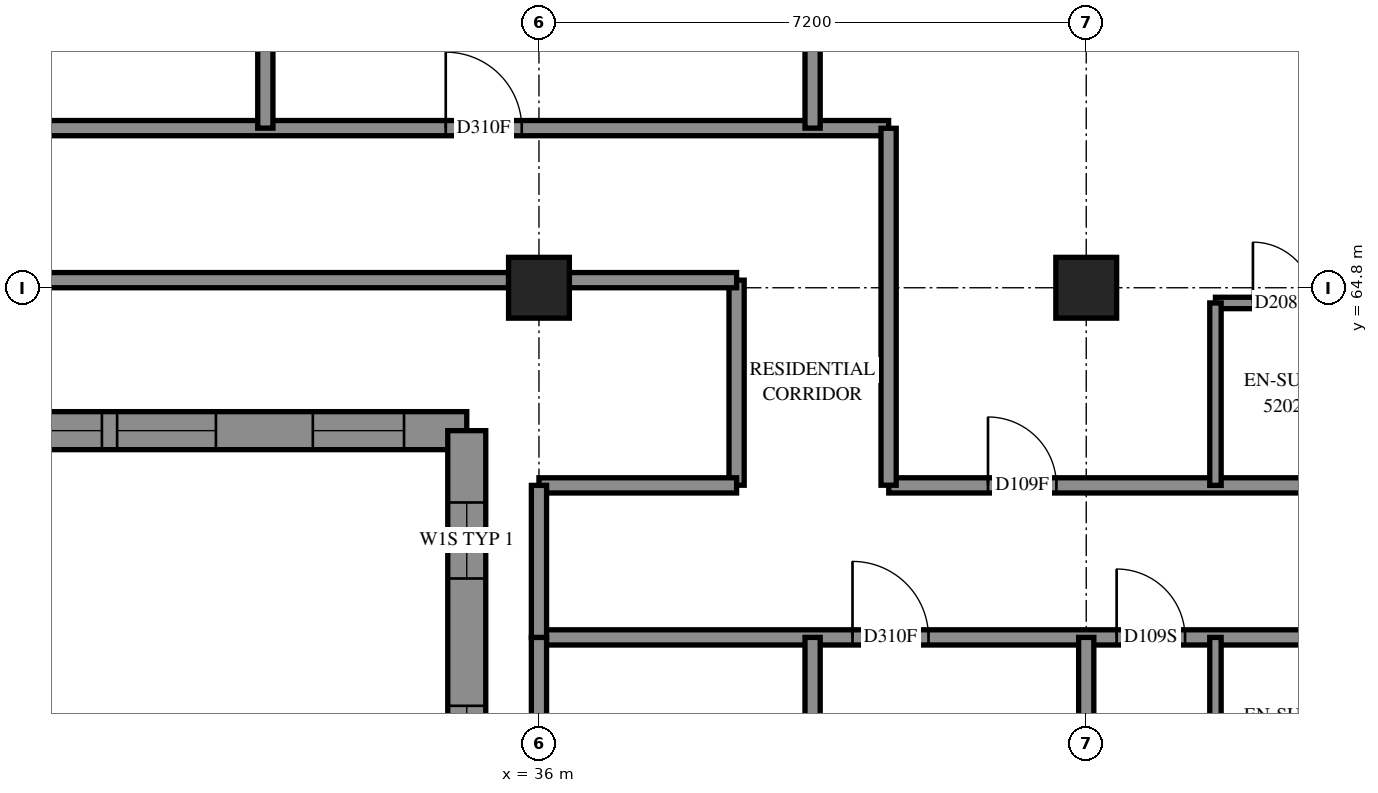
"""IFC4 building model, lengths in metres.
Left out: names, types, materials, properties, quantities, classifications, styles, units other than length and angle.
Written with IfcOpenShell. Run it as: python <this file> out.ifc"""

import sys

from ifc_helpers import new_model, si_unit, direction, frame, frame_2d, origin, origin_2d, place, context, subcontext, project, spatial, polyline, rectangle, outline, extrude, element, fill, save


model = new_model("IFC4")
c1 = context("Model", 3, precision=1e-05, world=origin(), true_north=direction((0.0, 1.0)))
c2 = subcontext(c1, "Body", "Model", "MODEL_VIEW")
j1 = project(units=[si_unit("LENGTHUNIT", "METRE"), si_unit("PLANEANGLEUNIT", "RADIAN")], contexts=[c1])
p1 = place(None, origin())
s1 = spatial("IfcSite", under=j1, at=p1, CompositionType="ELEMENT")
p2 = place(p1, origin())
s2 = spatial("IfcBuilding", under=s1, at=p2, CompositionType="ELEMENT")
p3 = place(p2, frame((0.0, 0.0, 193.0)))
s3 = spatial("IfcBuildingStorey", under=s2, at=p3, CompositionType="ELEMENT", Elevation=193.0)
for number, where, z_axis, x_axis in (
    (1, (36.0, 64.8, 0.0), (0.0, 0.0, 1.0), (1.0, 0.0, 0.0)),
    (2, (43.2, 64.8, 0.0), (0.0, 0.0, 1.0), (1.0, 0.0, 0.0)),
):
    element("IfcColumn", number, at=place(p3, frame(where, z_axis=z_axis, x_axis=x_axis)), inside=s3, PredefinedType="COLUMN", context=c2, shape_type="SweptSolid", body=[
        extrude(rectangle(XDim=0.8, YDim=0.8, at=origin_2d()), origin(), (0.0, 0.0, 1.0), 3.1),
    ])
p4 = place(p3, frame((19.72, 62.92, 0.0), z_axis=(0.0, 0.0, 1.0), x_axis=(1.0, 0.0, 0.0)))
e3 = element("IfcWall", 3, at=p4, inside=s3, PredefinedType="SOLIDWALL", context=c2, shape_type="SweptSolid", body=[
    extrude(outline(polyline([(-0.25, -0.25), (15.08, -0.25), (15.58, 0.25), (0.25, 0.25), (-0.25, -0.25)])), origin(), (0.0, 0.0, 1.0), 3.1),
])
p5 = place(p4, frame((2.28, 0.0, 0.45)))
e4 = element("IfcOpeningElement", 4, at=p5, cuts=e3, PredefinedType="OPENING", context=c2, shape_type="SweptSolid", body=[
    extrude(rectangle(XDim=1.3, YDim=2.5, at=frame_2d((0.65, 1.25))), frame((0.0, 0.26, 0.0), z_axis=(0.0, -1.0, 0.0), x_axis=(1.0, 0.0, 0.0)), (0.0, 0.0, 1.0), 0.52),
])
p6 = place(p4, frame((3.78, 0.0, 0.45)))
e5 = element("IfcOpeningElement", 5, at=p6, cuts=e3, PredefinedType="OPENING", context=c2, shape_type="SweptSolid", body=[
    extrude(rectangle(XDim=1.3, YDim=2.5, at=frame_2d((0.65, 1.25))), frame((0.0, 0.26, 0.0), z_axis=(0.0, -1.0, 0.0), x_axis=(1.0, 0.0, 0.0)), (0.0, 0.0, 1.0), 0.52),
])
p7 = place(p4, frame((5.88, 0.0, 0.45)))
e6 = element("IfcOpeningElement", 6, at=p7, cuts=e3, PredefinedType="OPENING", context=c2, shape_type="SweptSolid", body=[
    extrude(rectangle(XDim=1.3, YDim=2.5, at=frame_2d((0.65, 1.25))), frame((0.0, 0.26, 0.0), z_axis=(0.0, -1.0, 0.0), x_axis=(1.0, 0.0, 0.0)), (0.0, 0.0, 1.0), 0.52),
])
p8 = place(p4, frame((7.38, 0.0, 0.45)))
e7 = element("IfcOpeningElement", 7, at=p8, cuts=e3, PredefinedType="OPENING", context=c2, shape_type="SweptSolid", body=[
    extrude(rectangle(XDim=1.3, YDim=2.5, at=frame_2d((0.65, 1.25))), frame((0.0, 0.26, 0.0), z_axis=(0.0, -1.0, 0.0), x_axis=(1.0, 0.0, 0.0)), (0.0, 0.0, 1.0), 0.52),
])
p9 = place(p4, frame((9.23, 0.0, 0.45)))
e8 = element("IfcOpeningElement", 8, at=p9, cuts=e3, PredefinedType="OPENING", context=c2, shape_type="SweptSolid", body=[
    extrude(rectangle(XDim=1.3, YDim=2.5, at=frame_2d((0.65, 1.25))), frame((0.0, 0.26, 0.0), z_axis=(0.0, -1.0, 0.0), x_axis=(1.0, 0.0, 0.0)), (0.0, 0.0, 1.0), 0.52),
])
p10 = place(p4, frame((10.73, 0.0, 0.45)))
e9 = element("IfcOpeningElement", 9, at=p10, cuts=e3, PredefinedType="OPENING", context=c2, shape_type="SweptSolid", body=[
    extrude(rectangle(XDim=1.3, YDim=2.5, at=frame_2d((0.65, 1.25))), frame((0.0, 0.26, 0.0), z_axis=(0.0, -1.0, 0.0), x_axis=(1.0, 0.0, 0.0)), (0.0, 0.0, 1.0), 0.52),
])
p11 = place(p4, frame((0.565, 0.0, 0.45)))
e10 = element("IfcOpeningElement", 10, at=p11, cuts=e3, PredefinedType="OPENING", context=c2, shape_type="SweptSolid", body=[
    extrude(rectangle(XDim=1.2, YDim=2.5, at=frame_2d((0.6, 1.25))), frame((0.0, 0.26, 0.0), z_axis=(0.0, -1.0, 0.0), x_axis=(1.0, 0.0, 0.0)), (0.0, 0.0, 1.0), 0.52),
])
p12 = place(p4, frame((13.305, 0.0, 0.45)))
e11 = element("IfcOpeningElement", 11, at=p12, cuts=e3, PredefinedType="OPENING", context=c2, shape_type="SweptSolid", body=[
    extrude(rectangle(XDim=1.2, YDim=2.5, at=frame_2d((0.6, 1.25))), frame((0.0, 0.26, 0.0), z_axis=(0.0, -1.0, 0.0), x_axis=(1.0, 0.0, 0.0)), (0.0, 0.0, 1.0), 0.52),
])
p13 = place(p3, frame((35.05, 62.92, 0.0), z_axis=(0.0, 0.0, 1.0), x_axis=(0.0, -1.0, 0.0)))
e12 = element("IfcWall", 12, at=p13, inside=s3, PredefinedType="SOLIDWALL", context=c2, shape_type="SweptSolid", body=[
    extrude(outline(polyline([(0.25, -0.25), (6.52, -0.25), (6.02, 0.25), (-0.25, 0.25), (0.25, -0.25)])), origin(), (0.0, 0.0, 1.0), 3.1),
])
p14 = place(p13, frame((3.62, 0.0, 0.45)))
e13 = element("IfcOpeningElement", 13, at=p14, cuts=e12, PredefinedType="OPENING", context=c2, shape_type="SweptSolid", body=[
    extrude(rectangle(XDim=1.3, YDim=2.5, at=frame_2d((0.65, 1.25))), frame((0.0, 0.26, 0.0), z_axis=(0.0, -1.0, 0.0), x_axis=(1.0, 0.0, 0.0)), (0.0, 0.0, 1.0), 0.52),
])
p15 = place(p13, frame((0.945, 0.0, 0.45)))
e14 = element("IfcOpeningElement", 14, at=p15, cuts=e12, PredefinedType="OPENING", context=c2, shape_type="SweptSolid", body=[
    extrude(rectangle(XDim=1.0, YDim=2.5, at=frame_2d((0.5, 1.25))), frame((0.0, 0.26, 0.0), z_axis=(0.0, -1.0, 0.0), x_axis=(1.0, 0.0, 0.0)), (0.0, 0.0, 1.0), 0.52),
])
p16 = place(p3, frame((21.602, 66.9, 0.0), z_axis=(0.0, 0.0, 1.0), x_axis=(1.0, 0.0, 0.0)))
e15 = element("IfcWall", 15, at=p16, inside=s3, PredefinedType="PARTITIONING", context=c2, shape_type="SweptSolid", body=[
    extrude(rectangle(XDim=18.998, YDim=0.2, at=frame_2d((9.499, 0.0))), origin(), (0.0, 0.0, 1.0), 3.1),
])
p17 = place(p16, frame((5.972, 0.0, 0.0)))
e16 = element("IfcOpeningElement", 16, at=p17, cuts=e15, PredefinedType="OPENING", context=c2, shape_type="SweptSolid", body=[
    extrude(rectangle(XDim=1.0, YDim=2.1, at=frame_2d((0.5, 1.05))), frame((0.0, 0.11, 0.0), z_axis=(0.0, -1.0, 0.0), x_axis=(1.0, 0.0, 0.0)), (0.0, 0.0, 1.0), 0.22),
])
p18 = place(p16, frame((13.172, 0.0, 0.0)))
e17 = element("IfcOpeningElement", 17, at=p18, cuts=e15, PredefinedType="OPENING", context=c2, shape_type="SweptSolid", body=[
    extrude(rectangle(XDim=1.0, YDim=2.1, at=frame_2d((0.5, 1.05))), frame((0.0, 0.11, 0.0), z_axis=(0.0, -1.0, 0.0), x_axis=(1.0, 0.0, 0.0)), (0.0, 0.0, 1.0), 0.22),
])
p19 = place(p3, frame((36.0, 60.2, 0.0), z_axis=(0.0, 0.0, 1.0), x_axis=(1.0, 0.0, 0.0)))
e18 = element("IfcWall", 18, at=p19, inside=s3, PredefinedType="PARTITIONING", context=c2, shape_type="SweptSolid", body=[
    extrude(rectangle(XDim=17.0, YDim=0.2, at=frame_2d((8.5, 0.0))), origin(), (0.0, 0.0, 1.0), 3.1),
])
p20 = place(p19, frame((4.125, 0.0, 0.0)))
e19 = element("IfcOpeningElement", 19, at=p20, cuts=e18, PredefinedType="OPENING", context=c2, shape_type="SweptSolid", body=[
    extrude(rectangle(XDim=1.0, YDim=2.1, at=frame_2d((0.5, 1.05))), frame((0.0, 0.11, 0.0), z_axis=(0.0, -1.0, 0.0), x_axis=(1.0, 0.0, 0.0)), (0.0, 0.0, 1.0), 0.22),
])
p21 = place(p19, frame((7.6, 0.0, 0.0)))
e20 = element("IfcOpeningElement", 20, at=p21, cuts=e18, PredefinedType="OPENING", context=c2, shape_type="SweptSolid", body=[
    extrude(rectangle(XDim=0.9, YDim=2.1, at=frame_2d((0.45, 1.05))), frame((0.0, 0.11, 0.0), z_axis=(0.0, -1.0, 0.0), x_axis=(1.0, 0.0, 0.0)), (0.0, 0.0, 1.0), 0.22),
])
p22 = place(p19, frame((11.48, 0.0, 0.0)))
e21 = element("IfcOpeningElement", 21, at=p22, cuts=e18, PredefinedType="OPENING", context=c2, shape_type="SweptSolid", body=[
    extrude(rectangle(XDim=1.0, YDim=2.1, at=frame_2d((0.5, 1.05))), frame((0.0, 0.11, 0.0), z_axis=(0.0, -1.0, 0.0), x_axis=(1.0, 0.0, 0.0)), (0.0, 0.0, 1.0), 0.22),
])
p23 = place(p19, frame((15.805, 0.0, 0.0)))
e22 = element("IfcOpeningElement", 22, at=p23, cuts=e18, PredefinedType="OPENING", context=c2, shape_type="SweptSolid", body=[
    extrude(rectangle(XDim=1.0, YDim=2.1, at=frame_2d((0.5, 1.05))), frame((0.0, 0.11, 0.0), z_axis=(0.0, -1.0, 0.0), x_axis=(1.0, 0.0, 0.0)), (0.0, 0.0, 1.0), 0.22),
])
p24 = place(p3, frame((40.602, 62.2, 0.0), z_axis=(0.0, 0.0, 1.0), x_axis=(1.0, 0.0, 0.0)))
e23 = element("IfcWall", 23, at=p24, inside=s3, PredefinedType="PARTITIONING", context=c2, shape_type="SweptSolid", body=[
    extrude(rectangle(XDim=14.998, YDim=0.2, at=frame_2d((7.499, 0.0))), origin(), (0.0, 0.0, 1.0), 3.1),
])
p25 = place(p24, frame((1.306, 0.0, 0.0)))
e24 = element("IfcOpeningElement", 24, at=p25, cuts=e23, PredefinedType="OPENING", context=c2, shape_type="SweptSolid", body=[
    extrude(rectangle(XDim=0.9, YDim=2.1, at=frame_2d((0.45, 1.05))), frame((0.0, 0.11, 0.0), z_axis=(0.0, -1.0, 0.0), x_axis=(1.0, 0.0, 0.0)), (0.0, 0.0, 1.0), 0.22),
])
p26 = place(p24, frame((8.548, 0.0, 0.0)))
e25 = element("IfcOpeningElement", 25, at=p26, cuts=e23, PredefinedType="OPENING", context=c2, shape_type="SweptSolid", body=[
    extrude(rectangle(XDim=0.9, YDim=2.1, at=frame_2d((0.45, 1.05))), frame((0.0, 0.11, 0.0), z_axis=(0.0, -1.0, 0.0), x_axis=(1.0, 0.0, 0.0)), (0.0, 0.0, 1.0), 0.22),
])
p27 = place(p24, frame((10.198, 0.0, 0.0)))
e26 = element("IfcOpeningElement", 26, at=p27, cuts=e23, PredefinedType="OPENING", context=c2, shape_type="SweptSolid", body=[
    extrude(rectangle(XDim=0.9, YDim=2.1, at=frame_2d((0.45, 1.05))), frame((0.0, 0.11, 0.0), z_axis=(0.0, -1.0, 0.0), x_axis=(1.0, 0.0, 0.0)), (0.0, 0.0, 1.0), 0.22),
])
p28 = place(p24, frame((13.746, 0.0, 0.0)))
e27 = element("IfcOpeningElement", 27, at=p28, cuts=e23, PredefinedType="OPENING", context=c2, shape_type="SweptSolid", body=[
    extrude(rectangle(XDim=1.0, YDim=2.1, at=frame_2d((0.5, 1.05))), frame((0.0, 0.11, 0.0), z_axis=(0.0, -1.0, 0.0), x_axis=(1.0, 0.0, 0.0)), (0.0, 0.0, 1.0), 0.22),
])
p29 = place(p3, frame((29.2, 64.9, 0.0), z_axis=(0.0, 0.0, 1.0), x_axis=(1.0, 0.0, 0.0)))
e28 = element("IfcWall", 28, at=p29, inside=s3, PredefinedType="PARTITIONING", context=c2, shape_type="SweptSolid", body=[
    extrude(rectangle(XDim=6.4, YDim=0.2, at=frame_2d((3.2, 0.0))), origin(), (0.0, 0.0, 1.0), 2.6),
])
p30 = place(p3, frame((32.4, 66.9, 0.0), z_axis=(0.0, 0.0, 1.0), x_axis=(0.0, 1.0, 0.0)))
e29 = element("IfcWall", 29, at=p30, inside=s3, PredefinedType="PARTITIONING", context=c2, shape_type="SweptSolid", body=[
    extrude(rectangle(XDim=5.934, YDim=0.2, at=frame_2d((2.967, 0.0))), origin(), (0.0, 0.0, 1.0), 3.1),
])
p31 = place(p3, frame((39.6, 66.9, 0.0), z_axis=(0.0, 0.0, 1.0), x_axis=(0.0, 1.0, 0.0)))
e30 = element("IfcWall", 30, at=p31, inside=s3, PredefinedType="PARTITIONING", context=c2, shape_type="SweptSolid", body=[
    extrude(rectangle(XDim=5.902, YDim=0.2, at=frame_2d((2.951, 0.0))), origin(), (0.0, 0.0, 1.0), 3.1),
])
p32 = place(p3, frame((40.6, 62.202, 0.0), z_axis=(0.0, 0.0, 1.0), x_axis=(0.0, 1.0, 0.0)))
e31 = element("IfcWall", 31, at=p32, inside=s3, PredefinedType="PARTITIONING", context=c2, shape_type="SweptSolid", body=[
    extrude(rectangle(XDim=4.696, YDim=0.2, at=frame_2d((2.348, 0.0))), origin(), (0.0, 0.0, 1.0), 3.1),
])
p33 = place(p3, frame((44.9, 64.6, 0.0), z_axis=(0.0, 0.0, 1.0), x_axis=(1.0, 0.0, 0.0)))
e32 = element("IfcWall", 32, at=p33, inside=s3, PredefinedType="PARTITIONING", context=c2, shape_type="SweptSolid", body=[
    extrude(rectangle(XDim=3.8, YDim=0.15, at=frame_2d((1.9, 0.0))), origin(), (0.0, 0.0, 1.0), 3.1),
])
p34 = place(p33, frame((0.493, 0.0, 0.0)))
e33 = element("IfcOpeningElement", 33, at=p34, cuts=e32, PredefinedType="OPENING", context=c2, shape_type="SweptSolid", body=[
    extrude(rectangle(XDim=0.8, YDim=2.1, at=frame_2d((0.4, 1.05))), frame((0.0, 0.085, 0.0), z_axis=(0.0, -1.0, 0.0), x_axis=(1.0, 0.0, 0.0)), (0.0, 0.0, 1.0), 0.17),
])
p35 = place(p33, frame((2.507, 0.0, 0.0)))
e34 = element("IfcOpeningElement", 34, at=p35, cuts=e32, PredefinedType="OPENING", context=c2, shape_type="SweptSolid", body=[
    extrude(rectangle(XDim=0.8, YDim=2.1, at=frame_2d((0.4, 1.05))), frame((0.0, 0.085, 0.0), z_axis=(0.0, -1.0, 0.0), x_axis=(1.0, 0.0, 0.0)), (0.0, 0.0, 1.0), 0.17),
])
p36 = place(p3, frame((39.6, 56.9, 0.0), z_axis=(0.0, 0.0, 1.0), x_axis=(0.0, 1.0, 0.0)))
e35 = element("IfcWall", 35, at=p36, inside=s3, PredefinedType="PARTITIONING", context=c2, shape_type="SweptSolid", body=[
    extrude(rectangle(XDim=3.3, YDim=0.2, at=frame_2d((1.65, 0.0))), origin(), (0.0, 0.0, 1.0), 3.1),
])
p37 = place(p3, frame((38.6, 62.202, 0.0), z_axis=(0.0, 0.0, 1.0), x_axis=(0.0, 1.0, 0.0)))
e36 = element("IfcWall", 36, at=p37, inside=s3, PredefinedType="PARTITIONING", context=c2, shape_type="SweptSolid", body=[
    extrude(rectangle(XDim=2.698, YDim=0.2, at=frame_2d((1.349, 0.0))), origin(), (0.0, 0.0, 1.0), 3.1),
])
p38 = place(p3, frame((36.0, 62.2, 0.0), z_axis=(0.0, 0.0, 1.0), x_axis=(1.0, 0.0, 0.0)))
e37 = element("IfcWall", 37, at=p38, inside=s3, PredefinedType="PARTITIONING", context=c2, shape_type="SweptSolid", body=[
    extrude(rectangle(XDim=2.6, YDim=0.2, at=frame_2d((1.3, 0.0))), origin(), (0.0, 0.0, 1.0), 3.1),
])
for number, where, z_axis, x_axis in (
    (38, (44.9, 57.8, 0.0), (0.0, 0.0, 1.0), (0.0, 1.0, 0.0)),
    (39, (44.9, 62.2, 0.0), (0.0, 0.0, 1.0), (0.0, 1.0, 0.0)),
):
    element("IfcWall", number, at=place(p3, frame(where, z_axis=z_axis, x_axis=x_axis)), inside=s3, PredefinedType="PARTITIONING", context=c2, shape_type="SweptSolid", body=[
        extrude(rectangle(XDim=2.4, YDim=0.15, at=frame_2d((1.2, 0.0))), origin(), (0.0, 0.0, 1.0), 3.1),
    ])
p39 = place(p3, frame((36.4, 64.9, 0.0), z_axis=(0.0, 0.0, 1.0), x_axis=(1.0, 0.0, 0.0)))
e40 = element("IfcWall", 40, at=p39, inside=s3, PredefinedType="PARTITIONING", context=c2, shape_type="SweptSolid", body=[
    extrude(rectangle(XDim=2.2, YDim=0.2, at=frame_2d((1.1, 0.0))), origin(), (0.0, 0.0, 1.0), 3.1),
])
p40 = place(p3, frame((36.0, 58.0, 0.0), z_axis=(0.0, 0.0, 1.0), x_axis=(0.0, 1.0, 0.0)))
e41 = element("IfcWall", 41, at=p40, inside=s3, PredefinedType="PARTITIONING", context=c2, shape_type="SweptSolid", body=[
    extrude(rectangle(XDim=2.2, YDim=0.2, at=frame_2d((1.1, 0.0))), origin(), (0.0, 0.0, 1.0), 2.6),
])
p41 = place(p3, frame((43.2, 58.0, 0.0), z_axis=(0.0, 0.0, 1.0), x_axis=(0.0, 1.0, 0.0)))
e42 = element("IfcWall", 42, at=p41, inside=s3, PredefinedType="PARTITIONING", context=c2, shape_type="SweptSolid", body=[
    extrude(rectangle(XDim=2.2, YDim=0.2, at=frame_2d((1.1, 0.0))), origin(), (0.0, 0.0, 1.0), 3.1),
])
p42 = place(p3, frame((36.0, 60.2, 0.0), z_axis=(0.0, 0.0, 1.0), x_axis=(0.0, 1.0, 0.0)))
e43 = element("IfcWall", 43, at=p42, inside=s3, PredefinedType="PARTITIONING", context=c2, shape_type="SweptSolid", body=[
    extrude(rectangle(XDim=2.0, YDim=0.2, at=frame_2d((1.0, 0.0))), origin(), (0.0, 0.0, 1.0), 2.6),
])
p43 = place(p9, origin())
e44 = element("IfcWindow", 44, at=p43, inside=s3, PartitioningType="SINGLE_PANEL", PredefinedType="WINDOW", context=c2, shape_type="SweptSolid", body=[
    extrude(rectangle(XDim=1.3, YDim=2.5, at=frame_2d((0.65, 1.25))), frame((0.0, 0.18, 0.0), z_axis=(0.0, -1.0, 0.0), x_axis=(1.0, 0.0, 0.0)), (0.0, 0.0, 1.0), 0.06),
])
fill(e8, e44)
p44 = place(p10, origin())
e45 = element("IfcWindow", 45, at=p44, inside=s3, PartitioningType="SINGLE_PANEL", PredefinedType="WINDOW", context=c2, shape_type="SweptSolid", body=[
    extrude(rectangle(XDim=1.3, YDim=2.5, at=frame_2d((0.65, 1.25))), frame((0.0, 0.18, 0.0), z_axis=(0.0, -1.0, 0.0), x_axis=(1.0, 0.0, 0.0)), (0.0, 0.0, 1.0), 0.06),
])
fill(e9, e45)
p45 = place(p12, origin())
e46 = element("IfcWindow", 46, at=p45, inside=s3, PartitioningType="SINGLE_PANEL", PredefinedType="WINDOW", context=c2, shape_type="SweptSolid", body=[
    extrude(rectangle(XDim=1.2, YDim=2.5, at=frame_2d((0.6, 1.25))), frame((0.0, 0.18, 0.0), z_axis=(0.0, -1.0, 0.0), x_axis=(1.0, 0.0, 0.0)), (0.0, 0.0, 1.0), 0.06),
])
fill(e11, e46)
p46 = place(p14, origin())
e47 = element("IfcWindow", 47, at=p46, inside=s3, PartitioningType="SINGLE_PANEL", PredefinedType="WINDOW", context=c2, shape_type="SweptSolid", body=[
    extrude(rectangle(XDim=1.3, YDim=2.5, at=frame_2d((0.65, 1.25))), frame((0.0, 0.18, 0.0), z_axis=(0.0, -1.0, 0.0), x_axis=(1.0, 0.0, 0.0)), (0.0, 0.0, 1.0), 0.06),
])
fill(e13, e47)
p47 = place(p18, origin())
e48 = element("IfcDoor", 48, at=p47, inside=s3, OperationType="SINGLE_SWING_LEFT", PredefinedType="DOOR", context=c2, shape_type="SweptSolid", body=[
    extrude(rectangle(XDim=1.0, YDim=2.1, at=frame_2d((0.5, 1.05))), frame((0.0, 0.025, 0.0), z_axis=(0.0, -1.0, 0.0), x_axis=(1.0, 0.0, 0.0)), (0.0, 0.0, 1.0), 0.05),
])
fill(e17, e48)
p48 = place(p20, origin())
e49 = element("IfcDoor", 49, at=p48, inside=s3, OperationType="SINGLE_SWING_RIGHT", PredefinedType="DOOR", context=c2, shape_type="SweptSolid", body=[
    extrude(rectangle(XDim=1.0, YDim=2.1, at=frame_2d((0.5, 1.05))), frame((0.0, 0.025, 0.0), z_axis=(0.0, -1.0, 0.0), x_axis=(1.0, 0.0, 0.0)), (0.0, 0.0, 1.0), 0.05),
])
fill(e19, e49)
p49 = place(p21, origin())
e50 = element("IfcDoor", 50, at=p49, inside=s3, OperationType="SINGLE_SWING_LEFT", PredefinedType="DOOR", context=c2, shape_type="SweptSolid", body=[
    extrude(rectangle(XDim=0.9, YDim=2.1, at=frame_2d((0.45, 1.05))), frame((0.0, 0.025, 0.0), z_axis=(0.0, -1.0, 0.0), x_axis=(1.0, 0.0, 0.0)), (0.0, 0.0, 1.0), 0.05),
])
fill(e20, e50)
p50 = place(p25, origin())
e51 = element("IfcDoor", 51, at=p50, inside=s3, OperationType="SINGLE_SWING_LEFT", PredefinedType="DOOR", context=c2, shape_type="SweptSolid", body=[
    extrude(rectangle(XDim=0.9, YDim=2.1, at=frame_2d((0.45, 1.05))), frame((0.0, 0.025, 0.0), z_axis=(0.0, -1.0, 0.0), x_axis=(1.0, 0.0, 0.0)), (0.0, 0.0, 1.0), 0.05),
])
fill(e24, e51)
p51 = place(p34, origin())
e52 = element("IfcDoor", 52, at=p51, inside=s3, OperationType="SINGLE_SWING_RIGHT", PredefinedType="DOOR", context=c2, shape_type="SweptSolid", body=[
    extrude(rectangle(XDim=0.8, YDim=2.1, at=frame_2d((0.4, 1.05))), frame((0.0, 0.025, 0.0), z_axis=(0.0, -1.0, 0.0), x_axis=(1.0, 0.0, 0.0)), (0.0, 0.0, 1.0), 0.05),
])
fill(e33, e52)
p52 = place(p15, origin())
e53 = element("IfcWindow", 53, at=p52, inside=s3, PartitioningType="SINGLE_PANEL", PredefinedType="WINDOW", context=c2, shape_type="SweptSolid", body=[
    extrude(rectangle(XDim=1.0, YDim=2.5, at=frame_2d((0.5, 1.25))), frame((0.0, 0.18, 0.0), z_axis=(0.0, -1.0, 0.0), x_axis=(1.0, 0.0, 0.0)), (0.0, 0.0, 1.0), 0.06),
])
fill(e14, e53)
save(model, sys.argv[1])
